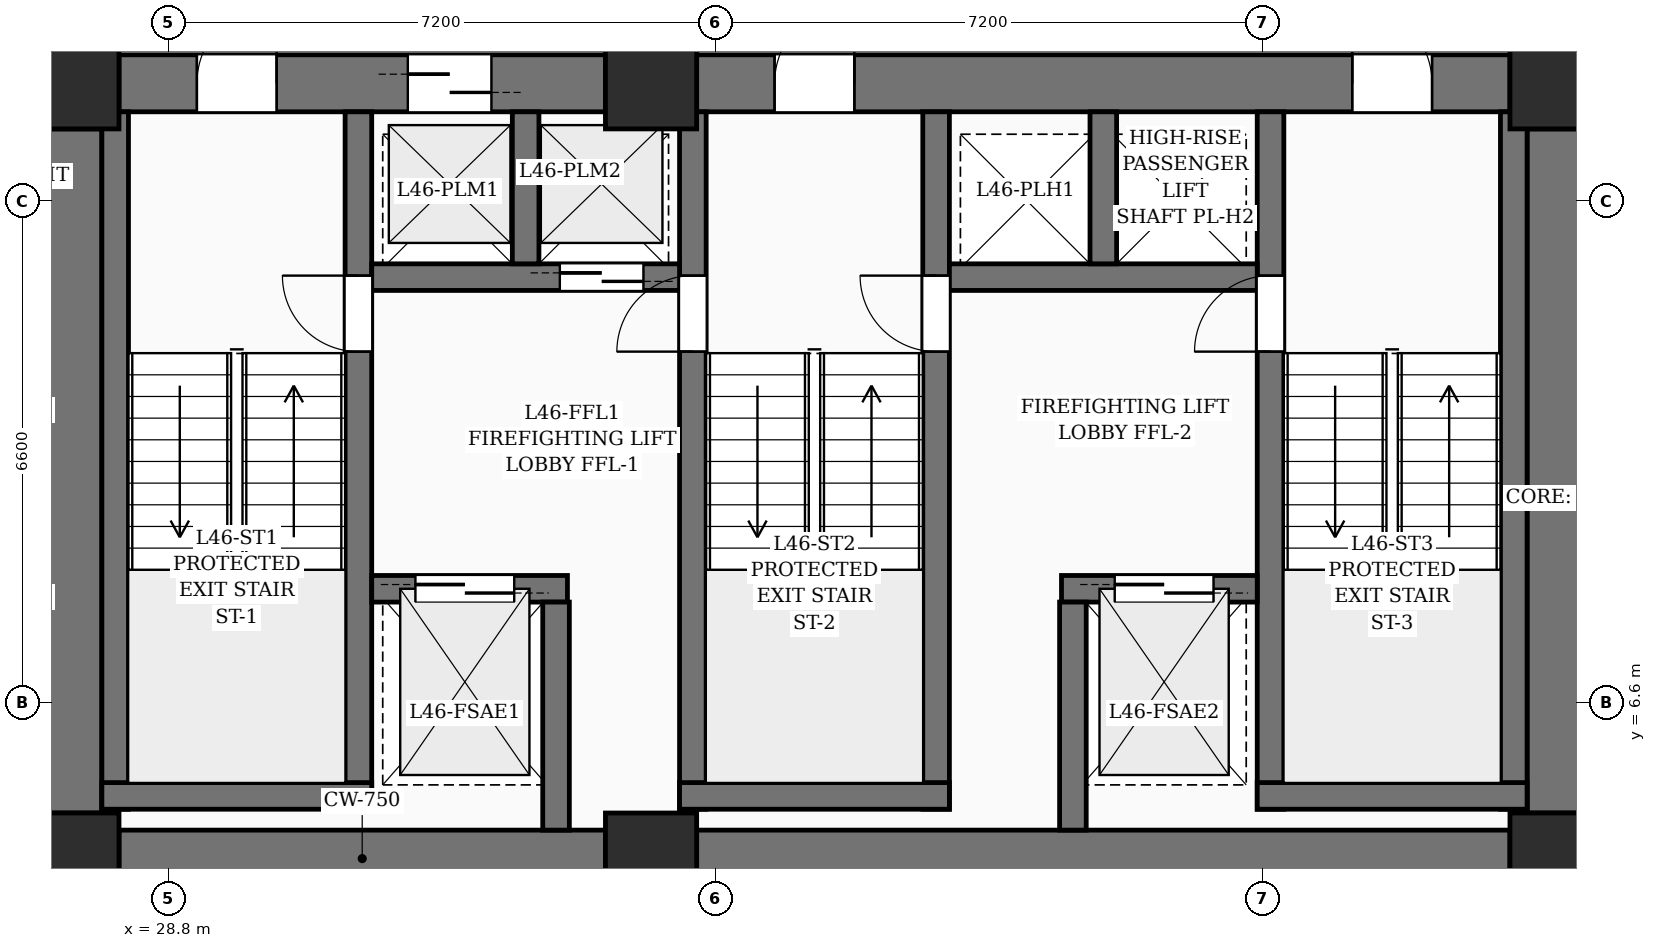
"""IFC4 building model, lengths in metres.
Left out: names, types, materials, properties, quantities, classifications, styles, units other than length and angle.
Written with IfcOpenShell. Run it as: python <this file> out.ifc"""

import sys

from ifc_helpers import new_model, si_unit, direction, frame, frame_2d, origin, origin_2d, place, context, subcontext, project, spatial, rectangle, extrude, element, fill, save


model = new_model("IFC4")
c1 = context("Model", 3, precision=1e-05, world=origin(), true_north=direction((0.0, 1.0)))
c2 = subcontext(c1, "Body", "Model", "MODEL_VIEW")
j1 = project(units=[si_unit("LENGTHUNIT", "METRE"), si_unit("PLANEANGLEUNIT", "RADIAN")], contexts=[c1])
p1 = place(None, origin())
s1 = spatial("IfcSite", under=j1, at=p1, CompositionType="ELEMENT")
p2 = place(p1, origin())
s2 = spatial("IfcBuilding", under=s1, at=p2, CompositionType="ELEMENT")
p3 = place(p2, frame((0.0, 0.0, 178.8)))
s3 = spatial("IfcBuildingStorey", under=s2, at=p3, CompositionType="ELEMENT", Elevation=178.8)
for number, where, z_axis, x_axis in (
    (1, (27.55, 4.55, 0.0), (0.0, 0.0, 1.0), (1.0, 0.0, 0.0)),
    (2, (35.15, 4.55, 0.0), (0.0, 0.0, 1.0), (1.0, 0.0, 0.0)),
    (3, (47.05, 4.55, 0.0), (0.0, 0.0, 1.0), (1.0, 0.0, 0.0)),
    (4, (27.55, 14.75, 0.0), (0.0, 0.0, 1.0), (1.0, 0.0, 0.0)),
    (5, (35.15, 14.75, 0.0), (0.0, 0.0, 1.0), (1.0, 0.0, 0.0)),
    (6, (47.05, 14.75, 0.0), (0.0, 0.0, 1.0), (1.0, 0.0, 0.0)),
):
    element("IfcColumn", number, at=place(p3, frame(where, z_axis=z_axis, x_axis=x_axis)), inside=s3, PredefinedType="COLUMN", context=c2, shape_type="SweptSolid", body=[
        extrude(rectangle(XDim=1.2, YDim=1.2, at=origin_2d()), origin(), (0.0, 0.0, 1.0), 3.6),
    ])
p4 = place(p3, frame((28.15, 4.55, 0.0), z_axis=(0.0, 0.0, 1.0), x_axis=(1.0, 0.0, 0.0)))
e7 = element("IfcWall", 7, at=p4, inside=s3, PredefinedType="SHEAR", context=c2, shape_type="SweptSolid", body=[
    extrude(rectangle(XDim=6.4, YDim=0.75, at=frame_2d((3.2, 0.0))), origin(), (0.0, 0.0, 1.0), 3.6),
])
p5 = place(p3, frame((35.75, 4.55, 0.0), z_axis=(0.0, 0.0, 1.0), x_axis=(1.0, 0.0, 0.0)))
e8 = element("IfcWall", 8, at=p5, inside=s3, PredefinedType="SHEAR", context=c2, shape_type="SweptSolid", body=[
    extrude(rectangle(XDim=10.7, YDim=0.75, at=frame_2d((5.35, 0.0))), origin(), (0.0, 0.0, 1.0), 3.6),
])
p6 = place(p3, frame((28.15, 14.75, 0.0), z_axis=(0.0, 0.0, 1.0), x_axis=(1.0, 0.0, 0.0)))
e9 = element("IfcWall", 9, at=p6, inside=s3, PredefinedType="SHEAR", context=c2, shape_type="SweptSolid", body=[
    extrude(rectangle(XDim=6.4, YDim=0.75, at=frame_2d((3.2, 0.0))), origin(), (0.0, 0.0, 1.0), 3.6),
])
p7 = place(p6, frame((1.025, 0.0, 0.0)))
e10 = element("IfcOpeningElement", 10, at=p7, cuts=e9, PredefinedType="OPENING", context=c2, shape_type="SweptSolid", body=[
    extrude(rectangle(XDim=1.05, YDim=2.15, at=frame_2d((0.525, 1.075))), frame((0.0, 0.385, 0.0), z_axis=(0.0, -1.0, 0.0), x_axis=(1.0, 0.0, 0.0)), (0.0, 0.0, 1.0), 0.77),
])
p8 = place(p6, frame((3.8, 0.0, 0.0)))
e11 = element("IfcOpeningElement", 11, at=p8, cuts=e9, PredefinedType="OPENING", context=c2, shape_type="SweptSolid", body=[
    extrude(rectangle(XDim=1.1, YDim=2.2, at=frame_2d((0.55, 1.1))), frame((0.0, 0.385, 0.0), z_axis=(0.0, -1.0, 0.0), x_axis=(1.0, 0.0, 0.0)), (0.0, 0.0, 1.0), 0.77),
])
p9 = place(p3, frame((35.75, 14.75, 0.0), z_axis=(0.0, 0.0, 1.0), x_axis=(1.0, 0.0, 0.0)))
e12 = element("IfcWall", 12, at=p9, inside=s3, PredefinedType="SHEAR", context=c2, shape_type="SweptSolid", body=[
    extrude(rectangle(XDim=10.7, YDim=0.75, at=frame_2d((5.35, 0.0))), origin(), (0.0, 0.0, 1.0), 3.6),
])
p10 = place(p9, frame((1.025, 0.0, 0.0)))
e13 = element("IfcOpeningElement", 13, at=p10, cuts=e12, PredefinedType="OPENING", context=c2, shape_type="SweptSolid", body=[
    extrude(rectangle(XDim=1.05, YDim=2.15, at=frame_2d((0.525, 1.075))), frame((0.0, 0.385, 0.0), z_axis=(0.0, -1.0, 0.0), x_axis=(1.0, 0.0, 0.0)), (0.0, 0.0, 1.0), 0.77),
])
p11 = place(p9, frame((8.625, 0.0, 0.0)))
e14 = element("IfcOpeningElement", 14, at=p11, cuts=e12, PredefinedType="OPENING", context=c2, shape_type="SweptSolid", body=[
    extrude(rectangle(XDim=1.05, YDim=2.15, at=frame_2d((0.525, 1.075))), frame((0.0, 0.385, 0.0), z_axis=(0.0, -1.0, 0.0), x_axis=(1.0, 0.0, 0.0)), (0.0, 0.0, 1.0), 0.77),
])
for number, where, z_axis, x_axis in (
    (15, (27.55, 5.15, 0.0), (0.0, 0.0, 1.0), (0.0, 1.0, 0.0)),
    (16, (47.05, 5.15, 0.0), (0.0, 0.0, 1.0), (0.0, 1.0, 0.0)),
):
    element("IfcWall", number, at=place(p3, frame(where, z_axis=z_axis, x_axis=x_axis)), inside=s3, PredefinedType="SHEAR", context=c2, shape_type="SweptSolid", body=[
        extrude(rectangle(XDim=9.0, YDim=0.75, at=frame_2d((4.5, 0.0))), origin(), (0.0, 0.0, 1.0), 3.6),
    ])
p12 = place(p3, frame((28.1, 5.2, 0.0), z_axis=(0.0, 0.0, 1.0), x_axis=(0.0, 1.0, 0.0)))
e17 = element("IfcWall", 17, at=p12, inside=s3, PredefinedType="SOLIDWALL", context=c2, shape_type="SweptSolid", body=[
    extrude(rectangle(XDim=9.175, YDim=0.35, at=frame_2d((4.587, 0.0))), origin(), (0.0, 0.0, 1.0), 3.6),
])
p13 = place(p3, frame((31.3, 5.2, 0.0), z_axis=(0.0, 0.0, 1.0), x_axis=(0.0, 1.0, 0.0)))
e18 = element("IfcWall", 18, at=p13, inside=s3, PredefinedType="SOLIDWALL", context=c2, shape_type="SweptSolid", body=[
    extrude(rectangle(XDim=9.175, YDim=0.35, at=frame_2d((4.587, 0.0))), origin(), (0.0, 0.0, 1.0), 3.6),
])
p14 = place(p13, frame((6.02, 0.0, 0.0)))
e19 = element("IfcOpeningElement", 19, at=p14, cuts=e18, PredefinedType="OPENING", context=c2, shape_type="SweptSolid", body=[
    extrude(rectangle(XDim=1.0, YDim=2.15, at=frame_2d((0.5, 1.075))), frame((0.0, 0.185, 0.0), z_axis=(0.0, -1.0, 0.0), x_axis=(1.0, 0.0, 0.0)), (0.0, 0.0, 1.0), 0.37),
])
p15 = place(p3, frame((27.925, 5.375, 0.0), z_axis=(0.0, 0.0, 1.0), x_axis=(1.0, 0.0, 0.0)))
e20 = element("IfcWall", 20, at=p15, inside=s3, PredefinedType="SOLIDWALL", context=c2, shape_type="SweptSolid", body=[
    extrude(rectangle(XDim=3.55, YDim=0.35, at=frame_2d((1.775, 0.0))), origin(), (0.0, 0.0, 1.0), 3.6),
])
p16 = place(p3, frame((35.7, 5.2, 0.0), z_axis=(0.0, 0.0, 1.0), x_axis=(0.0, 1.0, 0.0)))
e21 = element("IfcWall", 21, at=p16, inside=s3, PredefinedType="SOLIDWALL", context=c2, shape_type="SweptSolid", body=[
    extrude(rectangle(XDim=9.175, YDim=0.35, at=frame_2d((4.587, 0.0))), origin(), (0.0, 0.0, 1.0), 3.6),
])
p17 = place(p16, frame((6.02, 0.0, 0.0)))
e22 = element("IfcOpeningElement", 22, at=p17, cuts=e21, PredefinedType="OPENING", context=c2, shape_type="SweptSolid", body=[
    extrude(rectangle(XDim=1.0, YDim=2.15, at=frame_2d((0.5, 1.075))), frame((0.0, 0.185, 0.0), z_axis=(0.0, -1.0, 0.0), x_axis=(1.0, 0.0, 0.0)), (0.0, 0.0, 1.0), 0.37),
])
p18 = place(p3, frame((38.9, 5.2, 0.0), z_axis=(0.0, 0.0, 1.0), x_axis=(0.0, 1.0, 0.0)))
e23 = element("IfcWall", 23, at=p18, inside=s3, PredefinedType="SOLIDWALL", context=c2, shape_type="SweptSolid", body=[
    extrude(rectangle(XDim=9.175, YDim=0.35, at=frame_2d((4.587, 0.0))), origin(), (0.0, 0.0, 1.0), 3.6),
])
p19 = place(p18, frame((6.02, 0.0, 0.0)))
e24 = element("IfcOpeningElement", 24, at=p19, cuts=e23, PredefinedType="OPENING", context=c2, shape_type="SweptSolid", body=[
    extrude(rectangle(XDim=1.0, YDim=2.15, at=frame_2d((0.5, 1.075))), frame((0.0, 0.185, 0.0), z_axis=(0.0, -1.0, 0.0), x_axis=(1.0, 0.0, 0.0)), (0.0, 0.0, 1.0), 0.37),
])
p20 = place(p3, frame((35.525, 5.375, 0.0), z_axis=(0.0, 0.0, 1.0), x_axis=(1.0, 0.0, 0.0)))
e25 = element("IfcWall", 25, at=p20, inside=s3, PredefinedType="SOLIDWALL", context=c2, shape_type="SweptSolid", body=[
    extrude(rectangle(XDim=3.55, YDim=0.35, at=frame_2d((1.775, 0.0))), origin(), (0.0, 0.0, 1.0), 3.6),
])
p21 = place(p3, frame((43.3, 5.2, 0.0), z_axis=(0.0, 0.0, 1.0), x_axis=(0.0, 1.0, 0.0)))
e26 = element("IfcWall", 26, at=p21, inside=s3, PredefinedType="SOLIDWALL", context=c2, shape_type="SweptSolid", body=[
    extrude(rectangle(XDim=9.175, YDim=0.35, at=frame_2d((4.587, 0.0))), origin(), (0.0, 0.0, 1.0), 3.6),
])
p22 = place(p21, frame((6.02, 0.0, 0.0)))
e27 = element("IfcOpeningElement", 27, at=p22, cuts=e26, PredefinedType="OPENING", context=c2, shape_type="SweptSolid", body=[
    extrude(rectangle(XDim=1.0, YDim=2.15, at=frame_2d((0.5, 1.075))), frame((0.0, 0.185, 0.0), z_axis=(0.0, -1.0, 0.0), x_axis=(1.0, 0.0, 0.0)), (0.0, 0.0, 1.0), 0.37),
])
p23 = place(p3, frame((46.5, 5.2, 0.0), z_axis=(0.0, 0.0, 1.0), x_axis=(0.0, 1.0, 0.0)))
e28 = element("IfcWall", 28, at=p23, inside=s3, PredefinedType="SOLIDWALL", context=c2, shape_type="SweptSolid", body=[
    extrude(rectangle(XDim=9.175, YDim=0.35, at=frame_2d((4.587, 0.0))), origin(), (0.0, 0.0, 1.0), 3.6),
])
p24 = place(p3, frame((43.125, 5.375, 0.0), z_axis=(0.0, 0.0, 1.0), x_axis=(1.0, 0.0, 0.0)))
e29 = element("IfcWall", 29, at=p24, inside=s3, PredefinedType="SOLIDWALL", context=c2, shape_type="SweptSolid", body=[
    extrude(rectangle(XDim=3.55, YDim=0.35, at=frame_2d((1.775, 0.0))), origin(), (0.0, 0.0, 1.0), 3.6),
])
p25 = place(p3, frame((31.475, 8.1, 0.0), z_axis=(0.0, 0.0, 1.0), x_axis=(1.0, 0.0, 0.0)))
e30 = element("IfcWall", 30, at=p25, inside=s3, PredefinedType="SOLIDWALL", context=c2, shape_type="SweptSolid", body=[
    extrude(rectangle(XDim=2.575, YDim=0.35, at=frame_2d((1.288, 0.0))), origin(), (0.0, 0.0, 1.0), 3.6),
])
p26 = place(p25, frame((0.575, 0.0, 0.0)))
e31 = element("IfcOpeningElement", 31, at=p26, cuts=e30, PredefinedType="OPENING", context=c2, shape_type="SweptSolid", body=[
    extrude(rectangle(XDim=1.3, YDim=2.25, at=frame_2d((0.65, 1.125))), frame((0.0, 0.185, 0.0), z_axis=(0.0, -1.0, 0.0), x_axis=(1.0, 0.0, 0.0)), (0.0, 0.0, 1.0), 0.37),
])
p27 = place(p3, frame((40.55, 8.1, 0.0), z_axis=(0.0, 0.0, 1.0), x_axis=(1.0, 0.0, 0.0)))
e32 = element("IfcWall", 32, at=p27, inside=s3, PredefinedType="SOLIDWALL", context=c2, shape_type="SweptSolid", body=[
    extrude(rectangle(XDim=2.575, YDim=0.35, at=frame_2d((1.288, 0.0))), origin(), (0.0, 0.0, 1.0), 3.6),
])
p28 = place(p27, frame((0.7, 0.0, 0.0)))
e33 = element("IfcOpeningElement", 33, at=p28, cuts=e32, PredefinedType="OPENING", context=c2, shape_type="SweptSolid", body=[
    extrude(rectangle(XDim=1.3, YDim=2.25, at=frame_2d((0.65, 1.125))), frame((0.0, 0.185, 0.0), z_axis=(0.0, -1.0, 0.0), x_axis=(1.0, 0.0, 0.0)), (0.0, 0.0, 1.0), 0.37),
])
for number, where, z_axis, x_axis in (
    (34, (33.9, 4.925, 0.0), (0.0, 0.0, 1.0), (0.0, 1.0, 0.0)),
    (35, (40.7, 4.925, 0.0), (0.0, 0.0, 1.0), (0.0, 1.0, 0.0)),
):
    element("IfcWall", number, at=place(p3, frame(where, z_axis=z_axis, x_axis=x_axis)), inside=s3, PredefinedType="SOLIDWALL", context=c2, shape_type="SweptSolid", body=[
        extrude(rectangle(XDim=3.0, YDim=0.35, at=frame_2d((1.5, 0.0))), origin(), (0.0, 0.0, 1.0), 3.6),
    ])
p29 = place(p3, frame((31.475, 12.2, 0.0), z_axis=(0.0, 0.0, 1.0), x_axis=(1.0, 0.0, 0.0)))
e36 = element("IfcWall", 36, at=p29, inside=s3, PredefinedType="SOLIDWALL", context=c2, shape_type="SweptSolid", body=[
    extrude(rectangle(XDim=4.05, YDim=0.35, at=frame_2d((2.025, 0.0))), origin(), (0.0, 0.0, 1.0), 3.6),
])
p30 = place(p29, frame((2.475, 0.0, 0.0)))
e37 = element("IfcOpeningElement", 37, at=p30, cuts=e36, PredefinedType="OPENING", context=c2, shape_type="SweptSolid", body=[
    extrude(rectangle(XDim=1.1, YDim=2.2, at=frame_2d((0.55, 1.1))), frame((0.0, 0.185, 0.0), z_axis=(0.0, -1.0, 0.0), x_axis=(1.0, 0.0, 0.0)), (0.0, 0.0, 1.0), 0.37),
])
p31 = place(p3, frame((33.5, 12.375, 0.0), z_axis=(0.0, 0.0, 1.0), x_axis=(0.0, 1.0, 0.0)))
e38 = element("IfcWall", 38, at=p31, inside=s3, PredefinedType="SOLIDWALL", context=c2, shape_type="SweptSolid", body=[
    extrude(rectangle(XDim=2.0, YDim=0.35, at=frame_2d((1.0, 0.0))), origin(), (0.0, 0.0, 1.0), 3.6),
])
p32 = place(p3, frame((39.075, 12.2, 0.0), z_axis=(0.0, 0.0, 1.0), x_axis=(1.0, 0.0, 0.0)))
e39 = element("IfcWall", 39, at=p32, inside=s3, PredefinedType="SOLIDWALL", context=c2, shape_type="SweptSolid", body=[
    extrude(rectangle(XDim=4.05, YDim=0.35, at=frame_2d((2.025, 0.0))), origin(), (0.0, 0.0, 1.0), 3.6),
])
p33 = place(p3, frame((41.1, 12.375, 0.0), z_axis=(0.0, 0.0, 1.0), x_axis=(0.0, 1.0, 0.0)))
e40 = element("IfcWall", 40, at=p33, inside=s3, PredefinedType="SOLIDWALL", context=c2, shape_type="SweptSolid", body=[
    extrude(rectangle(XDim=2.0, YDim=0.35, at=frame_2d((1.0, 0.0))), origin(), (0.0, 0.0, 1.0), 3.6),
])
p34 = place(p7, origin())
e41 = element("IfcDoor", 41, at=p34, inside=s3, OperationType="SINGLE_SWING_RIGHT", PredefinedType="DOOR", context=c2, shape_type="SweptSolid", body=[
    extrude(rectangle(XDim=1.05, YDim=2.15, at=frame_2d((0.525, 1.075))), frame((0.0, 0.025, 0.0), z_axis=(0.0, -1.0, 0.0), x_axis=(1.0, 0.0, 0.0)), (0.0, 0.0, 1.0), 0.05),
])
fill(e10, e41)
p35 = place(p10, origin())
e42 = element("IfcDoor", 42, at=p35, inside=s3, OperationType="SINGLE_SWING_RIGHT", PredefinedType="DOOR", context=c2, shape_type="SweptSolid", body=[
    extrude(rectangle(XDim=1.05, YDim=2.15, at=frame_2d((0.525, 1.075))), frame((0.0, 0.025, 0.0), z_axis=(0.0, -1.0, 0.0), x_axis=(1.0, 0.0, 0.0)), (0.0, 0.0, 1.0), 0.05),
])
fill(e13, e42)
p36 = place(p11, origin())
e43 = element("IfcDoor", 43, at=p36, inside=s3, OperationType="SINGLE_SWING_LEFT", PredefinedType="DOOR", context=c2, shape_type="SweptSolid", body=[
    extrude(rectangle(XDim=1.05, YDim=2.15, at=frame_2d((0.525, 1.075))), frame((0.0, 0.025, 0.0), z_axis=(0.0, -1.0, 0.0), x_axis=(1.0, 0.0, 0.0)), (0.0, 0.0, 1.0), 0.05),
])
fill(e14, e43)
p37 = place(p14, origin())
e44 = element("IfcDoor", 44, at=p37, inside=s3, OperationType="SINGLE_SWING_RIGHT", PredefinedType="DOOR", context=c2, shape_type="SweptSolid", body=[
    extrude(rectangle(XDim=1.0, YDim=2.15, at=frame_2d((0.5, 1.075))), frame((0.0, 0.025, 0.0), z_axis=(0.0, -1.0, 0.0), x_axis=(1.0, 0.0, 0.0)), (0.0, 0.0, 1.0), 0.05),
])
fill(e19, e44)
p38 = place(p17, origin())
e45 = element("IfcDoor", 45, at=p38, inside=s3, OperationType="SINGLE_SWING_LEFT", PredefinedType="DOOR", context=c2, shape_type="SweptSolid", body=[
    extrude(rectangle(XDim=1.0, YDim=2.15, at=frame_2d((0.5, 1.075))), frame((0.0, 0.025, 0.0), z_axis=(0.0, -1.0, 0.0), x_axis=(1.0, 0.0, 0.0)), (0.0, 0.0, 1.0), 0.05),
])
fill(e22, e45)
p39 = place(p19, origin())
e46 = element("IfcDoor", 46, at=p39, inside=s3, OperationType="SINGLE_SWING_RIGHT", PredefinedType="DOOR", context=c2, shape_type="SweptSolid", body=[
    extrude(rectangle(XDim=1.0, YDim=2.15, at=frame_2d((0.5, 1.075))), frame((0.0, 0.025, 0.0), z_axis=(0.0, -1.0, 0.0), x_axis=(1.0, 0.0, 0.0)), (0.0, 0.0, 1.0), 0.05),
])
fill(e24, e46)
p40 = place(p22, origin())
e47 = element("IfcDoor", 47, at=p40, inside=s3, OperationType="SINGLE_SWING_LEFT", PredefinedType="DOOR", context=c2, shape_type="SweptSolid", body=[
    extrude(rectangle(XDim=1.0, YDim=2.15, at=frame_2d((0.5, 1.075))), frame((0.0, 0.025, 0.0), z_axis=(0.0, -1.0, 0.0), x_axis=(1.0, 0.0, 0.0)), (0.0, 0.0, 1.0), 0.05),
])
fill(e27, e47)
p41 = place(p26, origin())
e48 = element("IfcDoor", 48, at=p41, inside=s3, OperationType="DOUBLE_DOOR_SLIDING", PredefinedType="DOOR", context=c2, shape_type="SweptSolid", body=[
    extrude(rectangle(XDim=1.3, YDim=2.25, at=frame_2d((0.65, 1.125))), frame((0.0, 0.025, 0.0), z_axis=(0.0, -1.0, 0.0), x_axis=(1.0, 0.0, 0.0)), (0.0, 0.0, 1.0), 0.05),
])
fill(e31, e48)
p42 = place(p28, origin())
e49 = element("IfcDoor", 49, at=p42, inside=s3, OperationType="DOUBLE_DOOR_SLIDING", PredefinedType="DOOR", context=c2, shape_type="SweptSolid", body=[
    extrude(rectangle(XDim=1.3, YDim=2.25, at=frame_2d((0.65, 1.125))), frame((0.0, 0.025, 0.0), z_axis=(0.0, -1.0, 0.0), x_axis=(1.0, 0.0, 0.0)), (0.0, 0.0, 1.0), 0.05),
])
fill(e33, e49)
p43 = place(p8, origin())
e50 = element("IfcDoor", 50, at=p43, inside=s3, OperationType="DOUBLE_DOOR_SLIDING", PredefinedType="DOOR", context=c2, shape_type="SweptSolid", body=[
    extrude(rectangle(XDim=1.1, YDim=2.2, at=frame_2d((0.55, 1.1))), frame((0.0, 0.025, 0.0), z_axis=(0.0, -1.0, 0.0), x_axis=(1.0, 0.0, 0.0)), (0.0, 0.0, 1.0), 0.05),
])
fill(e11, e50)
p44 = place(p30, origin())
e51 = element("IfcDoor", 51, at=p44, inside=s3, OperationType="DOUBLE_DOOR_SLIDING", PredefinedType="DOOR", context=c2, shape_type="SweptSolid", body=[
    extrude(rectangle(XDim=1.1, YDim=2.2, at=frame_2d((0.55, 1.1))), frame((0.0, 0.025, 0.0), z_axis=(0.0, -1.0, 0.0), x_axis=(1.0, 0.0, 0.0)), (0.0, 0.0, 1.0), 0.05),
])
fill(e37, e51)
save(model, sys.argv[1])
